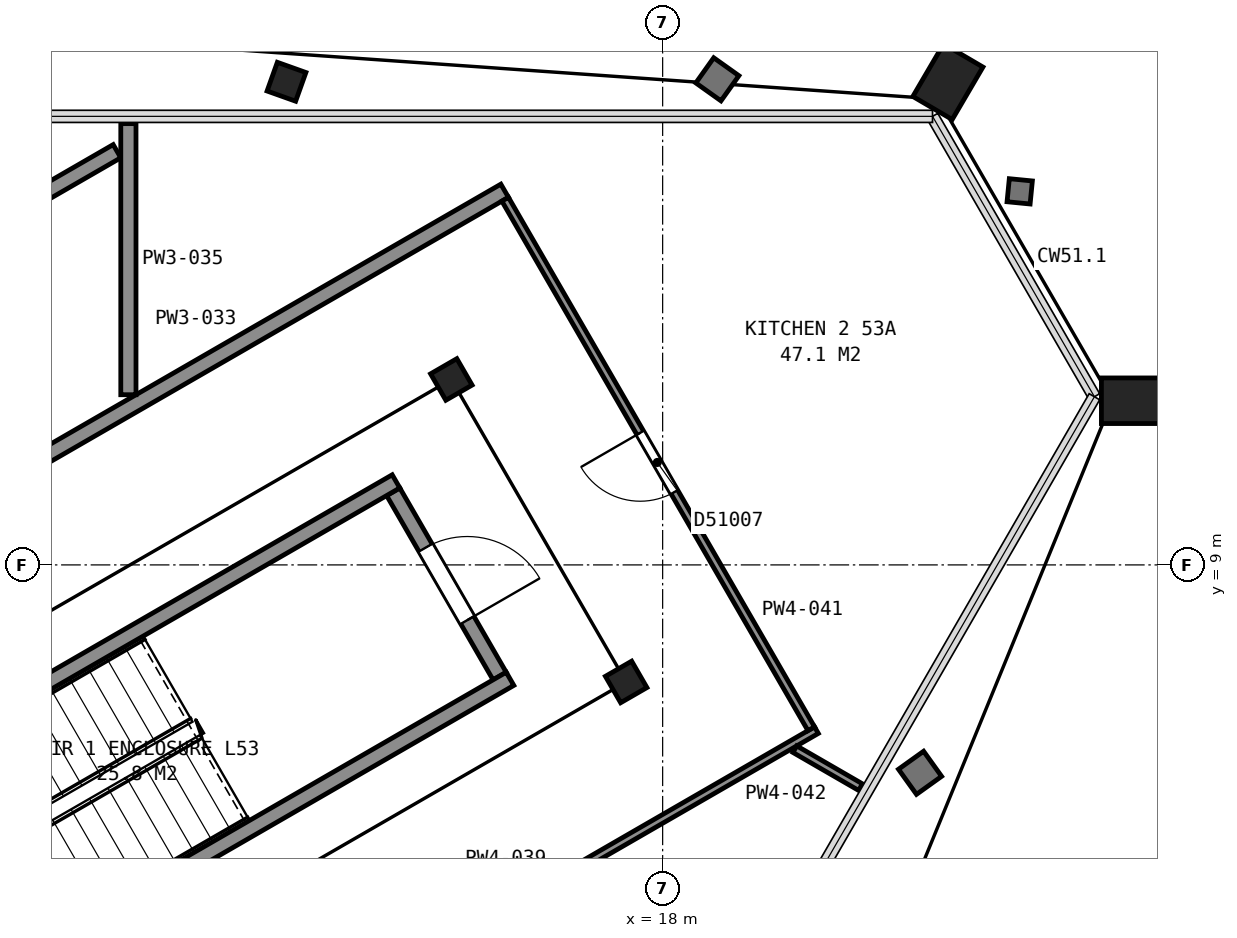
"""IFC4 building model, lengths in metres.
Left out: names, types, materials, properties, quantities, classifications, styles, units other than length and angle.
Written with IfcOpenShell. Run it as: python <this file> out.ifc"""

import sys

from ifc_helpers import new_model, si_unit, direction, frame, frame_2d, origin, origin_2d, place, context, subcontext, project, spatial, rectangle, hollow_rectangle, i_section, extrude, element, fill, save


model = new_model("IFC4")
c1 = context("Model", 3, precision=1e-05, world=origin(), true_north=direction((0.0, 1.0)))
c2 = subcontext(c1, "Body", "Model", "MODEL_VIEW")
j1 = project(units=[si_unit("LENGTHUNIT", "METRE"), si_unit("PLANEANGLEUNIT", "RADIAN")], contexts=[c1])
p1 = place(None, origin())
s1 = spatial("IfcSite", under=j1, at=p1, CompositionType="ELEMENT")
p2 = place(p1, origin())
s2 = spatial("IfcBuilding", under=s1, at=p2, CompositionType="ELEMENT")
p3 = place(p2, frame((0.0, 0.0, 213.8)))
s3 = spatial("IfcBuildingStorey", under=s2, at=p3, CompositionType="ELEMENT", Elevation=213.8)
p4 = place(p3, frame((21.627, 15.142, 0.065), z_axis=(0.108214891267, 0.184766906942, 0.976806391977), x_axis=(0.497103756844, -0.860970557833, 0.107784755309)))
e1 = element("IfcColumn", 1, at=p4, inside=s3, PredefinedType="COLUMN", context=c2, shape_type="SweptSolid", body=[
    extrude(hollow_rectangle(XDim=0.6, YDim=0.8, WallThickness=0.05, at=origin_2d()), origin(), (0.0, 0.0, 1.0), 3.655),
])
p5 = place(p3, frame((12.973, 15.138, 0.04), z_axis=(0.066255705929, 0.185476302527, 0.980412526762), x_axis=(0.997725155976, -6.7197846e-05, -0.067412970684)))
e2 = element("IfcColumn", 2, at=p5, inside=s3, PredefinedType="COLUMN", context=c2, shape_type="SweptSolid", body=[
    extrude(i_section(OverallWidth=0.401, OverallDepth=0.399, WebThickness=0.025, FlangeThickness=0.04, FilletRadius=0.015, at=origin_2d()), origin(), (0.0, 0.0, 1.0), 3.692),
])
p6 = place(p3, frame((23.924, 11.16, 0.065), z_axis=(0.213838328366, 0.0, 0.976869064574), x_axis=(0.497033455356, -0.860883256594, -0.10880148332)))
e3 = element("IfcColumn", 3, at=p6, inside=s3, PredefinedType="COLUMN", context=c2, shape_type="SweptSolid", body=[
    extrude(hollow_rectangle(XDim=0.6, YDim=0.8, WallThickness=0.05, at=origin_2d()), origin(), (0.0, 0.0, 1.0), 3.655),
])
for number, where, z_axis, x_axis in (
    (4, (17.52, 7.46, 0.0), (0.0, 0.0, 1.0), (0.5, -0.866, 0.0)),
    (5, (15.22, 11.44, 0.0), (0.0, 0.0, 1.0), (0.5, -0.866, 0.0)),
):
    element("IfcColumn", number, at=place(p3, frame(where, z_axis=z_axis, x_axis=x_axis)), inside=s3, PredefinedType="COLUMN", context=c2, shape_type="SweptSolid", body=[
        extrude(i_section(OverallWidth=0.401, OverallDepth=0.399, WebThickness=0.025, FlangeThickness=0.04, FilletRadius=0.015, at=origin_2d()), origin(), (0.0, 0.0, 1.0), 3.7),
    ])
p7 = place(p3, frame((15.855, 7.538, 0.0), z_axis=(0.0, 0.0, 1.0), x_axis=(-0.500049511043, 0.865996816683, 0.0)))
e6 = element("IfcWall", 6, at=p7, inside=s3, PredefinedType="PARTITIONING", context=c2, shape_type="SweptSolid", body=[
    extrude(rectangle(XDim=2.8, YDim=0.2, at=frame_2d((1.4, 0.0))), origin(), (0.0, 0.0, 1.0), 3.45),
])
p8 = place(p7, frame((0.85, 0.0, 0.0)))
e7 = element("IfcOpeningElement", 7, at=p8, cuts=e6, PredefinedType="OPENING", context=c2, shape_type="SweptSolid", body=[
    extrude(rectangle(XDim=1.1, YDim=2.1, at=frame_2d((0.55, 1.05))), frame((0.0, 0.11, 0.0), z_axis=(0.0, -1.0, 0.0), x_axis=(1.0, 0.0, 0.0)), (0.0, 0.0, 1.0), 0.22),
])
for number, where, z_axis, x_axis in (
    (8, (6.178, 5.299, 0.0), (0.0, 0.0, 1.0), (0.866, 0.5, 0.0)),
    (9, (7.678, 2.701, 0.0), (0.0, 0.0, 1.0), (0.866, 0.5, 0.0)),
):
    element("IfcWall", number, at=place(p3, frame(where, z_axis=z_axis, x_axis=x_axis)), inside=s3, PredefinedType="PARTITIONING", context=c2, shape_type="SweptSolid", body=[
        extrude(rectangle(XDim=9.6, YDim=0.2, at=frame_2d((4.8, 0.0))), origin(), (0.0, 0.0, 1.0), 3.45),
    ])
p9 = place(p3, frame((8.488, 13.096, 0.0), z_axis=(0.0, 0.0, 1.0), x_axis=(0.866031650062, 0.499989180974, 0.0)))
e10 = element("IfcWall", 10, at=p9, inside=s3, PredefinedType="PARTITIONING", context=c2, shape_type="SweptSolid", body=[
    extrude(rectangle(XDim=2.694, YDim=0.2, at=frame_2d((1.347, 0.0))), origin(), (0.0, 0.0, 1.0), 2.713),
])
p10 = place(p3, frame((8.895, 9.867, 0.0), z_axis=(0.0, 0.0, 1.0), x_axis=(0.866079355551, 0.499906541154, 0.0)))
e11 = element("IfcWall", 11, at=p10, inside=s3, PredefinedType="PARTITIONING", context=c2, shape_type="SweptSolid", body=[
    extrude(rectangle(XDim=8.113, YDim=0.2, at=frame_2d((4.056, 0.0))), origin(), (0.0, 0.0, 1.0), 2.713),
])
p11 = place(p3, frame((10.971, 11.239, 0.0), z_axis=(0.0, 0.0, 1.0), x_axis=(0.0, 1.0, 0.0)))
e12 = element("IfcWall", 12, at=p11, inside=s3, PredefinedType="PARTITIONING", context=c2, shape_type="SweptSolid", body=[
    extrude(rectangle(XDim=3.567, YDim=0.2, at=frame_2d((1.783, 0.0))), origin(), (0.0, 0.0, 1.0), 2.713),
])
p12 = place(p3, frame((12.952, 2.744, 0.0), z_axis=(0.0, 0.0, 1.0), x_axis=(0.86608949446, 0.499888975259, 0.0)))
e13 = element("IfcWall", 13, at=p12, inside=s3, PredefinedType="PARTITIONING", context=c2, shape_type="SweptSolid", body=[
    extrude(rectangle(XDim=8.165, YDim=0.1, at=frame_2d((4.083, 0.0))), origin(), (0.0, 0.0, 1.0), 2.713),
])
p13 = place(p3, frame((15.928, 13.812, 0.0), z_axis=(0.0, 0.0, 1.0), x_axis=(0.500422653123, -0.865781247337, 0.0)))
e14 = element("IfcWall", 14, at=p13, inside=s3, PredefinedType="PARTITIONING", context=c2, shape_type="SweptSolid", body=[
    extrude(rectangle(XDim=8.047, YDim=0.1, at=frame_2d((4.024, 0.0))), origin(), (0.0, 0.0, 1.0), 2.713),
])
p14 = place(p13, frame((3.55, 0.0, 0.0)))
e15 = element("IfcOpeningElement", 15, at=p14, cuts=e14, PredefinedType="OPENING", context=c2, shape_type="SweptSolid", body=[
    extrude(rectangle(XDim=0.9, YDim=2.1, at=frame_2d((0.45, 1.05))), frame((0.0, 0.06, 0.0), z_axis=(0.0, -1.0, 0.0), x_axis=(1.0, 0.0, 0.0)), (0.0, 0.0, 1.0), 0.12),
])
p15 = place(p3, frame((19.739, 6.576, 0.0), z_axis=(0.0, 0.0, 1.0), x_axis=(0.865855657918, -0.500293893279, 0.0)))
e16 = element("IfcWall", 16, at=p15, inside=s3, PredefinedType="PARTITIONING", context=c2, shape_type="SweptSolid", body=[
    extrude(rectangle(XDim=0.999, YDim=0.1, at=frame_2d((0.499, 0.0))), origin(), (0.0, 0.0, 1.0), 2.713),
])
p16 = place(p8, origin())
e17 = element("IfcDoor", 17, at=p16, inside=s3, OperationType="SINGLE_SWING_LEFT", PredefinedType="DOOR", context=c2, shape_type="SweptSolid", body=[
    extrude(rectangle(XDim=1.1, YDim=2.1, at=frame_2d((0.55, 1.05))), frame((0.0, 0.025, 0.0), z_axis=(0.0, -1.0, 0.0), x_axis=(1.0, 0.0, 0.0)), (0.0, 0.0, 1.0), 0.05),
])
fill(e7, e17)
p17 = place(p14, origin())
e18 = element("IfcDoor", 18, at=p17, inside=s3, OperationType="SINGLE_SWING_LEFT", PredefinedType="DOOR", context=c2, shape_type="SweptSolid", body=[
    extrude(rectangle(XDim=0.9, YDim=2.1, at=frame_2d((0.45, 1.05))), frame((0.0, 0.025, 0.0), z_axis=(0.0, -1.0, 0.0), x_axis=(1.0, 0.0, 0.0)), (0.0, 0.0, 1.0), 0.05),
])
fill(e15, e18)
save(model, sys.argv[1])
